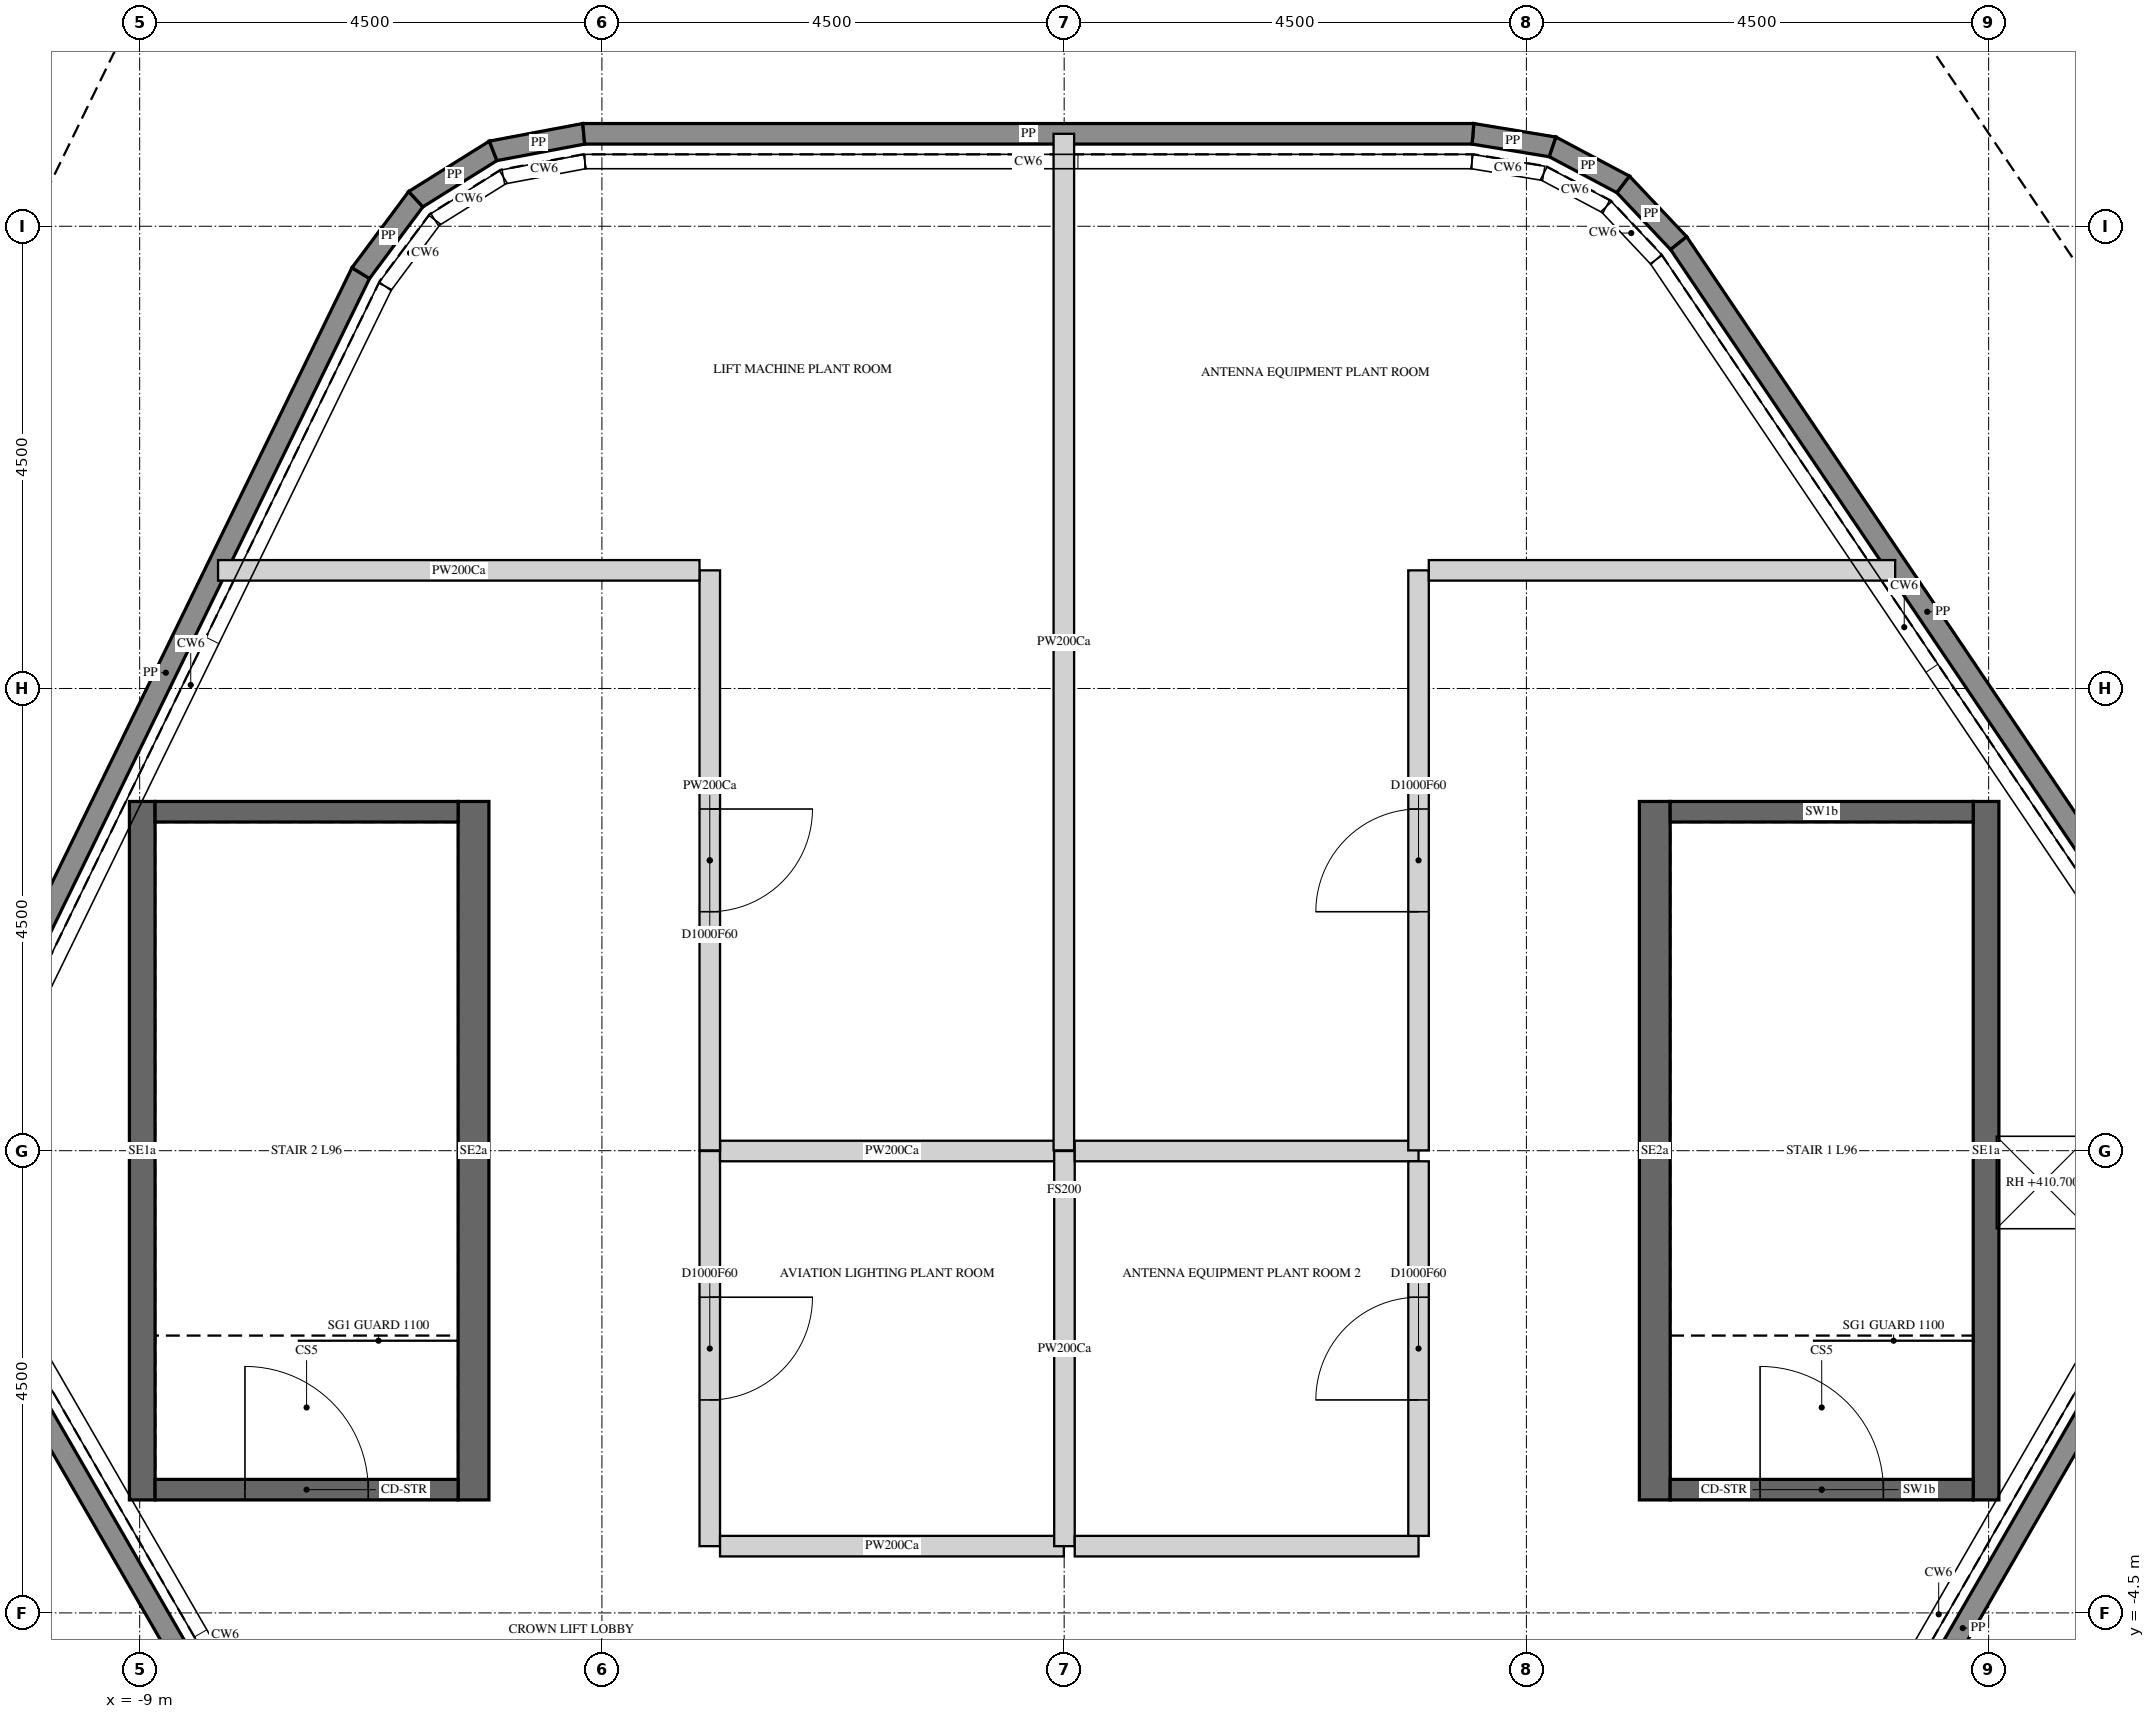
"""IFC4 building model, lengths in metres.
Left out: names, types, materials, properties, quantities, classifications, styles, units other than length and angle.
Written with IfcOpenShell. Run it as: python <this file> out.ifc"""

import sys

from ifc_helpers import new_model, si_unit, direction, frame, frame_2d, origin, origin_2d, place, context, subcontext, project, spatial, polyline, rectangle, outline, extrude, element, fill, save


model = new_model("IFC4")
c1 = context("Model", 3, precision=1e-05, world=origin(), true_north=direction((0.0, 1.0)))
c2 = subcontext(c1, "Body", "Model", "MODEL_VIEW")
j1 = project(units=[si_unit("LENGTHUNIT", "METRE"), si_unit("PLANEANGLEUNIT", "RADIAN")], contexts=[c1])
p1 = place(None, origin())
s1 = spatial("IfcSite", under=j1, at=p1, CompositionType="ELEMENT")
p2 = place(p1, origin())
s2 = spatial("IfcBuilding", under=s1, at=p2, CompositionType="ELEMENT")
p3 = place(p2, frame((0.0, 0.0, 406.2)))
s3 = spatial("IfcBuildingStorey", under=s2, at=p3, CompositionType="ELEMENT", Elevation=406.2)
p4 = place(p3, frame((3.98, 9.9, 4.5), z_axis=(0.0, 0.0, 1.0), x_axis=(0.986777234729, -0.162082352589, 0.0)))
e1 = element("IfcWall", 1, at=p4, inside=s3, PredefinedType="PARAPET", context=c2, shape_type="SweptSolid", body=[
    extrude(outline(polyline([(0.008, -0.1), (0.77, -0.1), (0.803, 0.1), (-0.008, 0.1), (0.008, -0.1)])), origin(), (0.0, 0.0, 1.0), 1.1),
])
p5 = place(p3, frame((4.756, 9.772, 4.5), z_axis=(0.0, 0.0, 1.0), x_axis=(0.882908380549, -0.469545302986, 0.0)))
e2 = element("IfcWall", 2, at=p5, inside=s3, PredefinedType="PARAPET", context=c2, shape_type="SweptSolid", body=[
    extrude(outline(polyline([(0.016, -0.1), (0.761, -0.1), (0.794, 0.1), (-0.016, 0.1), (0.016, -0.1)])), origin(), (0.0, 0.0, 1.0), 1.1),
])
p6 = place(p3, frame((5.442, 9.407, 4.5), z_axis=(0.0, 0.0, 1.0), x_axis=(0.686322682682, -0.7272971712, 0.0)))
e3 = element("IfcWall", 3, at=p6, inside=s3, PredefinedType="PARAPET", context=c2, shape_type="SweptSolid", body=[
    extrude(outline(polyline([(0.016, -0.1), (0.779, -0.1), (0.795, 0.1), (-0.016, 0.1), (0.016, -0.1)])), origin(), (0.0, 0.0, 1.0), 1.1),
])
p7 = place(p3, frame((5.982, 8.835, 4.5), z_axis=(0.0, 0.0, 1.0), x_axis=(0.559195765234, -0.829035642264, 0.0)))
e4 = element("IfcWall", 4, at=p7, inside=s3, PredefinedType="PARAPET", context=c2, shape_type="SweptSolid", body=[
    extrude(outline(polyline([(0.008, -0.1), (8.647, -0.1), (8.666, 0.1), (-0.008, 0.1), (0.008, -0.1)])), origin(), (0.0, 0.0, 1.0), 1.1),
])
p8 = place(p3, frame((10.912, -0.899, 4.5), z_axis=(0.0, 0.0, 1.0), x_axis=(-0.500015396624, -0.866016514357, 0.0)))
e5 = element("IfcWall", 5, at=p8, inside=s3, PredefinedType="PARAPET", context=c2, shape_type="SweptSolid", body=[
    extrude(outline(polyline([(0.009, -0.1), (8.649, -0.1), (8.665, 0.1), (-0.009, 0.1), (0.009, -0.1)])), origin(), (0.0, 0.0, 1.0), 1.1),
])
p9 = place(p3, frame((-6.235, -9.0, 4.5), z_axis=(0.0, 0.0, 1.0), x_axis=(-0.499994245368, 0.866028726197, 0.0)))
e6 = element("IfcWall", 6, at=p9, inside=s3, PredefinedType="PARAPET", context=c2, shape_type="SweptSolid", body=[
    extrude(outline(polyline([(0.009, -0.1), (8.649, -0.1), (8.665, 0.1), (-0.009, 0.1), (0.009, -0.1)])), origin(), (0.0, 0.0, 1.0), 1.1),
])
p10 = place(p3, frame((-10.643, 0.763, 4.5), z_axis=(0.0, 0.0, 1.0), x_axis=(0.438370290227, 0.898794464072, 0.0)))
e7 = element("IfcWall", 7, at=p10, inside=s3, PredefinedType="PARAPET", context=c2, shape_type="SweptSolid", body=[
    extrude(outline(polyline([(0.008, -0.1), (8.648, -0.1), (8.666, 0.1), (-0.008, 0.1), (0.008, -0.1)])), origin(), (0.0, 0.0, 1.0), 1.1),
])
p11 = place(p3, frame((-6.848, 8.544, 4.5), z_axis=(0.0, 0.0, 1.0), x_axis=(0.597210287038, 0.802084704414, 0.0)))
e8 = element("IfcWall", 8, at=p11, inside=s3, PredefinedType="PARAPET", context=c2, shape_type="SweptSolid", body=[
    extrude(outline(polyline([(0.009, -0.1), (0.878, -0.1), (0.916, 0.1), (-0.009, 0.1), (0.009, -0.1)])), origin(), (0.0, 0.0, 1.0), 1.1),
])
p12 = place(p3, frame((-6.312, 9.263, 4.5), z_axis=(0.0, 0.0, 1.0), x_axis=(0.84798285133, 0.530023663481, 0.0)))
e9 = element("IfcWall", 9, at=p12, inside=s3, PredefinedType="PARAPET", context=c2, shape_type="SweptSolid", body=[
    extrude(outline(polyline([(0.019, -0.1), (0.869, -0.1), (0.906, 0.1), (-0.019, 0.1), (0.019, -0.1)])), origin(), (0.0, 0.0, 1.0), 1.1),
])
p13 = place(p3, frame((-5.559, 9.734, 4.5), z_axis=(0.0, 0.0, 1.0), x_axis=(0.982736396807, 0.185011281791, 0.0)))
e10 = element("IfcWall", 10, at=p13, inside=s3, PredefinedType="PARAPET", context=c2, shape_type="SweptSolid", body=[
    extrude(outline(polyline([(0.019, -0.1), (0.888, -0.1), (0.906, 0.1), (-0.019, 0.1), (0.019, -0.1)])), origin(), (0.0, 0.0, 1.0), 1.1),
])
p14 = place(p3, frame((-4.677, 9.9, 4.5), z_axis=(0.0, 0.0, 1.0), x_axis=(1.0, 0.0, 0.0)))
e11 = element("IfcWall", 11, at=p14, inside=s3, PredefinedType="PARAPET", context=c2, shape_type="SweptSolid", body=[
    extrude(outline(polyline([(0.009, -0.1), (8.649, -0.1), (8.665, 0.1), (-0.009, 0.1), (0.009, -0.1)])), origin(), (0.0, 0.0, 1.0), 1.1),
])
p15 = place(p3, frame((5.75, -3.4, -0.2), z_axis=(0.0, 0.0, 1.0), x_axis=(0.0, 1.0, 0.0)))
e12 = element("IfcWall", 12, at=p15, inside=s3, PredefinedType="SHEAR", context=c2, shape_type="SweptSolid", body=[
    extrude(rectangle(XDim=6.8, YDim=0.3, at=frame_2d((3.4, 0.0))), origin(), (0.0, 0.0, 1.0), 4.5),
])
p16 = place(p3, frame((8.975, -3.4, -0.2), z_axis=(0.0, 0.0, 1.0), x_axis=(0.0, 1.0, 0.0)))
e13 = element("IfcWall", 13, at=p16, inside=s3, PredefinedType="SHEAR", context=c2, shape_type="SweptSolid", body=[
    extrude(rectangle(XDim=6.8, YDim=0.25, at=frame_2d((3.4, 0.0))), origin(), (0.0, 0.0, 1.0), 4.5),
])
p17 = place(p3, frame((5.9, 3.3, -0.2), z_axis=(0.0, 0.0, 1.0), x_axis=(1.0, 0.0, 0.0)))
e14 = element("IfcWall", 14, at=p17, inside=s3, PredefinedType="SHEAR", context=c2, shape_type="SweptSolid", body=[
    extrude(rectangle(XDim=2.95, YDim=0.2, at=frame_2d((1.475, 0.0))), origin(), (0.0, 0.0, 1.0), 4.5),
])
p18 = place(p3, frame((5.9, -3.3, -0.2), z_axis=(0.0, 0.0, 1.0), x_axis=(1.0, 0.0, 0.0)))
e15 = element("IfcWall", 15, at=p18, inside=s3, PredefinedType="SHEAR", context=c2, shape_type="SweptSolid", body=[
    extrude(rectangle(XDim=2.95, YDim=0.2, at=frame_2d((1.475, 0.0))), origin(), (0.0, 0.0, 1.0), 4.5),
])
p19 = place(p18, frame((0.875, 0.0, 0.2)))
e16 = element("IfcOpeningElement", 16, at=p19, cuts=e15, PredefinedType="OPENING", context=c2, shape_type="SweptSolid", body=[
    extrude(rectangle(XDim=1.2, YDim=2.4, at=frame_2d((0.6, 1.2))), frame((0.0, 0.11, 0.0), z_axis=(0.0, -1.0, 0.0), x_axis=(1.0, 0.0, 0.0)), (0.0, 0.0, 1.0), 0.22),
])
p20 = place(p3, frame((-5.75, -3.4, -0.2), z_axis=(0.0, 0.0, 1.0), x_axis=(0.0, 1.0, 0.0)))
e17 = element("IfcWall", 17, at=p20, inside=s3, PredefinedType="SHEAR", context=c2, shape_type="SweptSolid", body=[
    extrude(rectangle(XDim=6.8, YDim=0.3, at=frame_2d((3.4, 0.0))), origin(), (0.0, 0.0, 1.0), 4.5),
])
p21 = place(p3, frame((-8.975, -3.4, -0.2), z_axis=(0.0, 0.0, 1.0), x_axis=(0.0, 1.0, 0.0)))
e18 = element("IfcWall", 18, at=p21, inside=s3, PredefinedType="SHEAR", context=c2, shape_type="SweptSolid", body=[
    extrude(rectangle(XDim=6.8, YDim=0.25, at=frame_2d((3.4, 0.0))), origin(), (0.0, 0.0, 1.0), 4.5),
])
p22 = place(p3, frame((-8.85, 3.3, -0.2), z_axis=(0.0, 0.0, 1.0), x_axis=(1.0, 0.0, 0.0)))
e19 = element("IfcWall", 19, at=p22, inside=s3, PredefinedType="SHEAR", context=c2, shape_type="SweptSolid", body=[
    extrude(rectangle(XDim=2.95, YDim=0.2, at=frame_2d((1.475, 0.0))), origin(), (0.0, 0.0, 1.0), 4.5),
])
p23 = place(p3, frame((-8.85, -3.3, -0.2), z_axis=(0.0, 0.0, 1.0), x_axis=(1.0, 0.0, 0.0)))
e20 = element("IfcWall", 20, at=p23, inside=s3, PredefinedType="SHEAR", context=c2, shape_type="SweptSolid", body=[
    extrude(rectangle(XDim=2.95, YDim=0.2, at=frame_2d((1.475, 0.0))), origin(), (0.0, 0.0, 1.0), 4.5),
])
p24 = place(p23, frame((0.875, 0.0, 0.2)))
e21 = element("IfcOpeningElement", 21, at=p24, cuts=e20, PredefinedType="OPENING", context=c2, shape_type="SweptSolid", body=[
    extrude(rectangle(XDim=1.2, YDim=2.4, at=frame_2d((0.6, 1.2))), frame((0.0, 0.11, 0.0), z_axis=(0.0, -1.0, 0.0), x_axis=(1.0, 0.0, 0.0)), (0.0, 0.0, 1.0), 0.22),
])
p25 = place(p3, frame((-3.45, -0.003, 0.0), z_axis=(0.0, 0.0, 1.0), x_axis=(0.0, -1.0, 0.0)))
e22 = element("IfcWall", 22, at=p25, inside=s3, PredefinedType="PARTITIONING", context=c2, shape_type="SweptSolid", body=[
    extrude(rectangle(XDim=3.847, YDim=0.2, at=frame_2d((1.924, 0.0))), origin(), (0.0, 0.0, 1.0), 4.3),
])
p26 = place(p25, frame((1.424, 0.0, 0.0)))
e23 = element("IfcOpeningElement", 23, at=p26, cuts=e22, PredefinedType="OPENING", context=c2, shape_type="SweptSolid", body=[
    extrude(rectangle(XDim=1.0, YDim=2.1, at=frame_2d((0.5, 1.05))), frame((0.0, 0.11, 0.0), z_axis=(0.0, -1.0, 0.0), x_axis=(1.0, 0.0, 0.0)), (0.0, 0.0, 1.0), 0.22),
])
p27 = place(p3, frame((-3.35, -0.003, 0.0), z_axis=(0.0, 0.0, 1.0), x_axis=(1.0, 0.0, 0.0)))
e24 = element("IfcWall", 24, at=p27, inside=s3, PredefinedType="PARTITIONING", context=c2, shape_type="SweptSolid", body=[
    extrude(rectangle(XDim=3.347, YDim=0.2, at=frame_2d((1.674, 0.0))), origin(), (0.0, 0.0, 1.0), 4.3),
])
p28 = place(p3, frame((-3.45, 5.65, 0.0), z_axis=(0.0, 0.0, 1.0), x_axis=(0.0, -1.0, 0.0)))
e25 = element("IfcWall", 25, at=p28, inside=s3, PredefinedType="PARTITIONING", context=c2, shape_type="SweptSolid", body=[
    extrude(rectangle(XDim=5.647, YDim=0.2, at=frame_2d((2.823, 0.0))), origin(), (0.0, 0.0, 1.0), 4.3),
])
p29 = place(p28, frame((2.323, 0.0, 0.0)))
e26 = element("IfcOpeningElement", 26, at=p29, cuts=e25, PredefinedType="OPENING", context=c2, shape_type="SweptSolid", body=[
    extrude(rectangle(XDim=1.0, YDim=2.1, at=frame_2d((0.5, 1.05))), frame((0.0, 0.11, 0.0), z_axis=(0.0, -1.0, 0.0), x_axis=(1.0, 0.0, 0.0)), (0.0, 0.0, 1.0), 0.22),
])
p30 = place(p3, frame((-3.55, 5.65, 0.0), z_axis=(0.0, 0.0, 1.0), x_axis=(-1.0, 0.0, 0.0)))
e27 = element("IfcWall", 27, at=p30, inside=s3, PredefinedType="PARTITIONING", context=c2, shape_type="SweptSolid", body=[
    extrude(rectangle(XDim=4.687, YDim=0.2, at=frame_2d((2.344, 0.0))), origin(), (0.0, 0.0, 1.0), 4.3),
])
p31 = place(p3, frame((-0.003, -3.85, 0.0), z_axis=(0.0, 0.0, 1.0), x_axis=(-1.0, 0.0, 0.0)))
e28 = element("IfcWall", 28, at=p31, inside=s3, PredefinedType="PARTITIONING", context=c2, shape_type="SweptSolid", body=[
    extrude(rectangle(XDim=3.347, YDim=0.2, at=frame_2d((1.674, 0.0))), origin(), (0.0, 0.0, 1.0), 4.3),
])
p32 = place(p3, frame((-0.003, 9.9, 0.0), z_axis=(0.0, 0.0, 1.0), x_axis=(0.0, -1.0, 0.0)))
e29 = element("IfcWall", 29, at=p32, inside=s3, PredefinedType="PARTITIONING", context=c2, shape_type="SweptSolid", body=[
    extrude(rectangle(XDim=9.897, YDim=0.2, at=frame_2d((4.948, 0.0))), origin(), (0.0, 0.0, 1.0), 4.3),
])
p33 = place(p3, frame((0.003, -3.85, 0.0), z_axis=(0.0, 0.0, 1.0), x_axis=(0.0, 1.0, 0.0)))
e30 = element("IfcWall", 30, at=p33, inside=s3, PredefinedType="PARTITIONING", context=c2, shape_type="SweptSolid", body=[
    extrude(rectangle(XDim=3.847, YDim=0.2, at=frame_2d((1.924, 0.0))), origin(), (0.0, 0.0, 1.0), 4.3),
])
for number, where, z_axis, x_axis in (
    (31, (0.103, -0.003, 0.0), (0.0, 0.0, 1.0), (1.0, 0.0, 0.0)),
    (32, (3.45, -3.85, 0.0), (0.0, 0.0, 1.0), (-1.0, 0.0, 0.0)),
):
    element("IfcWall", number, at=place(p3, frame(where, z_axis=z_axis, x_axis=x_axis)), inside=s3, PredefinedType="PARTITIONING", context=c2, shape_type="SweptSolid", body=[
        extrude(rectangle(XDim=3.347, YDim=0.2, at=frame_2d((1.673, 0.0))), origin(), (0.0, 0.0, 1.0), 4.3),
    ])
p34 = place(p3, frame((3.45, -3.75, 0.0), z_axis=(0.0, 0.0, 1.0), x_axis=(0.0, 1.0, 0.0)))
e33 = element("IfcWall", 33, at=p34, inside=s3, PredefinedType="PARTITIONING", context=c2, shape_type="SweptSolid", body=[
    extrude(rectangle(XDim=3.647, YDim=0.2, at=frame_2d((1.823, 0.0))), origin(), (0.0, 0.0, 1.0), 4.3),
])
p35 = place(p34, frame((1.323, 0.0, 0.0)))
e34 = element("IfcOpeningElement", 34, at=p35, cuts=e33, PredefinedType="OPENING", context=c2, shape_type="SweptSolid", body=[
    extrude(rectangle(XDim=1.0, YDim=2.1, at=frame_2d((0.5, 1.05))), frame((0.0, 0.11, 0.0), z_axis=(0.0, -1.0, 0.0), x_axis=(1.0, 0.0, 0.0)), (0.0, 0.0, 1.0), 0.22),
])
p36 = place(p3, frame((3.45, 0.003, 0.0), z_axis=(0.0, 0.0, 1.0), x_axis=(0.0, 1.0, 0.0)))
e35 = element("IfcWall", 35, at=p36, inside=s3, PredefinedType="PARTITIONING", context=c2, shape_type="SweptSolid", body=[
    extrude(rectangle(XDim=5.647, YDim=0.2, at=frame_2d((2.823, 0.0))), origin(), (0.0, 0.0, 1.0), 4.3),
])
p37 = place(p36, frame((2.323, 0.0, 0.0)))
e36 = element("IfcOpeningElement", 36, at=p37, cuts=e35, PredefinedType="OPENING", context=c2, shape_type="SweptSolid", body=[
    extrude(rectangle(XDim=1.0, YDim=2.1, at=frame_2d((0.5, 1.05))), frame((0.0, 0.11, 0.0), z_axis=(0.0, -1.0, 0.0), x_axis=(1.0, 0.0, 0.0)), (0.0, 0.0, 1.0), 0.22),
])
p38 = place(p3, frame((8.09, 5.65, 0.0), z_axis=(0.0, 0.0, 1.0), x_axis=(-1.0, 0.0, 0.0)))
e37 = element("IfcWall", 37, at=p38, inside=s3, PredefinedType="PARTITIONING", context=c2, shape_type="SweptSolid", body=[
    extrude(rectangle(XDim=4.54, YDim=0.2, at=frame_2d((2.27, 0.0))), origin(), (0.0, 0.0, 1.0), 4.3),
])
p39 = place(p2, frame((0.0, 0.0, 410.7)))
p40 = place(p39, frame((0.0, 0.0, -0.2)))
p41 = place(p40, frame((9.525, -0.31, 0.0)))
p42 = place(p41, frame((0.0, 0.0, 0.15)))
e38 = element("IfcDoor", 38, at=p42, inside=s3, OperationType="SINGLE_SWING_LEFT", PredefinedType="TRAPDOOR", context=c2, shape_type="SweptSolid", body=[
    extrude(rectangle(XDim=0.9, YDim=0.9, at=origin_2d()), origin(), (0.0, 0.0, 1.0), 0.05),
])
p43 = place(p19, origin())
e39 = element("IfcDoor", 39, at=p43, inside=s3, OperationType="SINGLE_SWING_LEFT", PredefinedType="DOOR", context=c2, shape_type="SweptSolid", body=[
    extrude(rectangle(XDim=1.2, YDim=2.4, at=frame_2d((0.6, 1.2))), frame((0.0, 0.025, 0.0), z_axis=(0.0, -1.0, 0.0), x_axis=(1.0, 0.0, 0.0)), (0.0, 0.0, 1.0), 0.05),
])
fill(e16, e39)
p44 = place(p24, origin())
e40 = element("IfcDoor", 40, at=p44, inside=s3, OperationType="SINGLE_SWING_LEFT", PredefinedType="DOOR", context=c2, shape_type="SweptSolid", body=[
    extrude(rectangle(XDim=1.2, YDim=2.4, at=frame_2d((0.6, 1.2))), frame((0.0, 0.025, 0.0), z_axis=(0.0, -1.0, 0.0), x_axis=(1.0, 0.0, 0.0)), (0.0, 0.0, 1.0), 0.05),
])
fill(e21, e40)
p45 = place(p26, origin())
e41 = element("IfcDoor", 41, at=p45, inside=s3, OperationType="SINGLE_SWING_RIGHT", PredefinedType="DOOR", context=c2, shape_type="SweptSolid", body=[
    extrude(rectangle(XDim=1.0, YDim=2.1, at=frame_2d((0.5, 1.05))), frame((0.0, 0.025, 0.0), z_axis=(0.0, -1.0, 0.0), x_axis=(1.0, 0.0, 0.0)), (0.0, 0.0, 1.0), 0.05),
])
fill(e23, e41)
p46 = place(p29, origin())
e42 = element("IfcDoor", 42, at=p46, inside=s3, OperationType="SINGLE_SWING_LEFT", PredefinedType="DOOR", context=c2, shape_type="SweptSolid", body=[
    extrude(rectangle(XDim=1.0, YDim=2.1, at=frame_2d((0.5, 1.05))), frame((0.0, 0.025, 0.0), z_axis=(0.0, -1.0, 0.0), x_axis=(1.0, 0.0, 0.0)), (0.0, 0.0, 1.0), 0.05),
])
fill(e26, e42)
p47 = place(p35, origin())
e43 = element("IfcDoor", 43, at=p47, inside=s3, OperationType="SINGLE_SWING_RIGHT", PredefinedType="DOOR", context=c2, shape_type="SweptSolid", body=[
    extrude(rectangle(XDim=1.0, YDim=2.1, at=frame_2d((0.5, 1.05))), frame((0.0, 0.025, 0.0), z_axis=(0.0, -1.0, 0.0), x_axis=(1.0, 0.0, 0.0)), (0.0, 0.0, 1.0), 0.05),
])
fill(e34, e43)
p48 = place(p37, origin())
e44 = element("IfcDoor", 44, at=p48, inside=s3, OperationType="SINGLE_SWING_LEFT", PredefinedType="DOOR", context=c2, shape_type="SweptSolid", body=[
    extrude(rectangle(XDim=1.0, YDim=2.1, at=frame_2d((0.5, 1.05))), frame((0.0, 0.025, 0.0), z_axis=(0.0, -1.0, 0.0), x_axis=(1.0, 0.0, 0.0)), (0.0, 0.0, 1.0), 0.05),
])
fill(e36, e44)
save(model, sys.argv[1])
